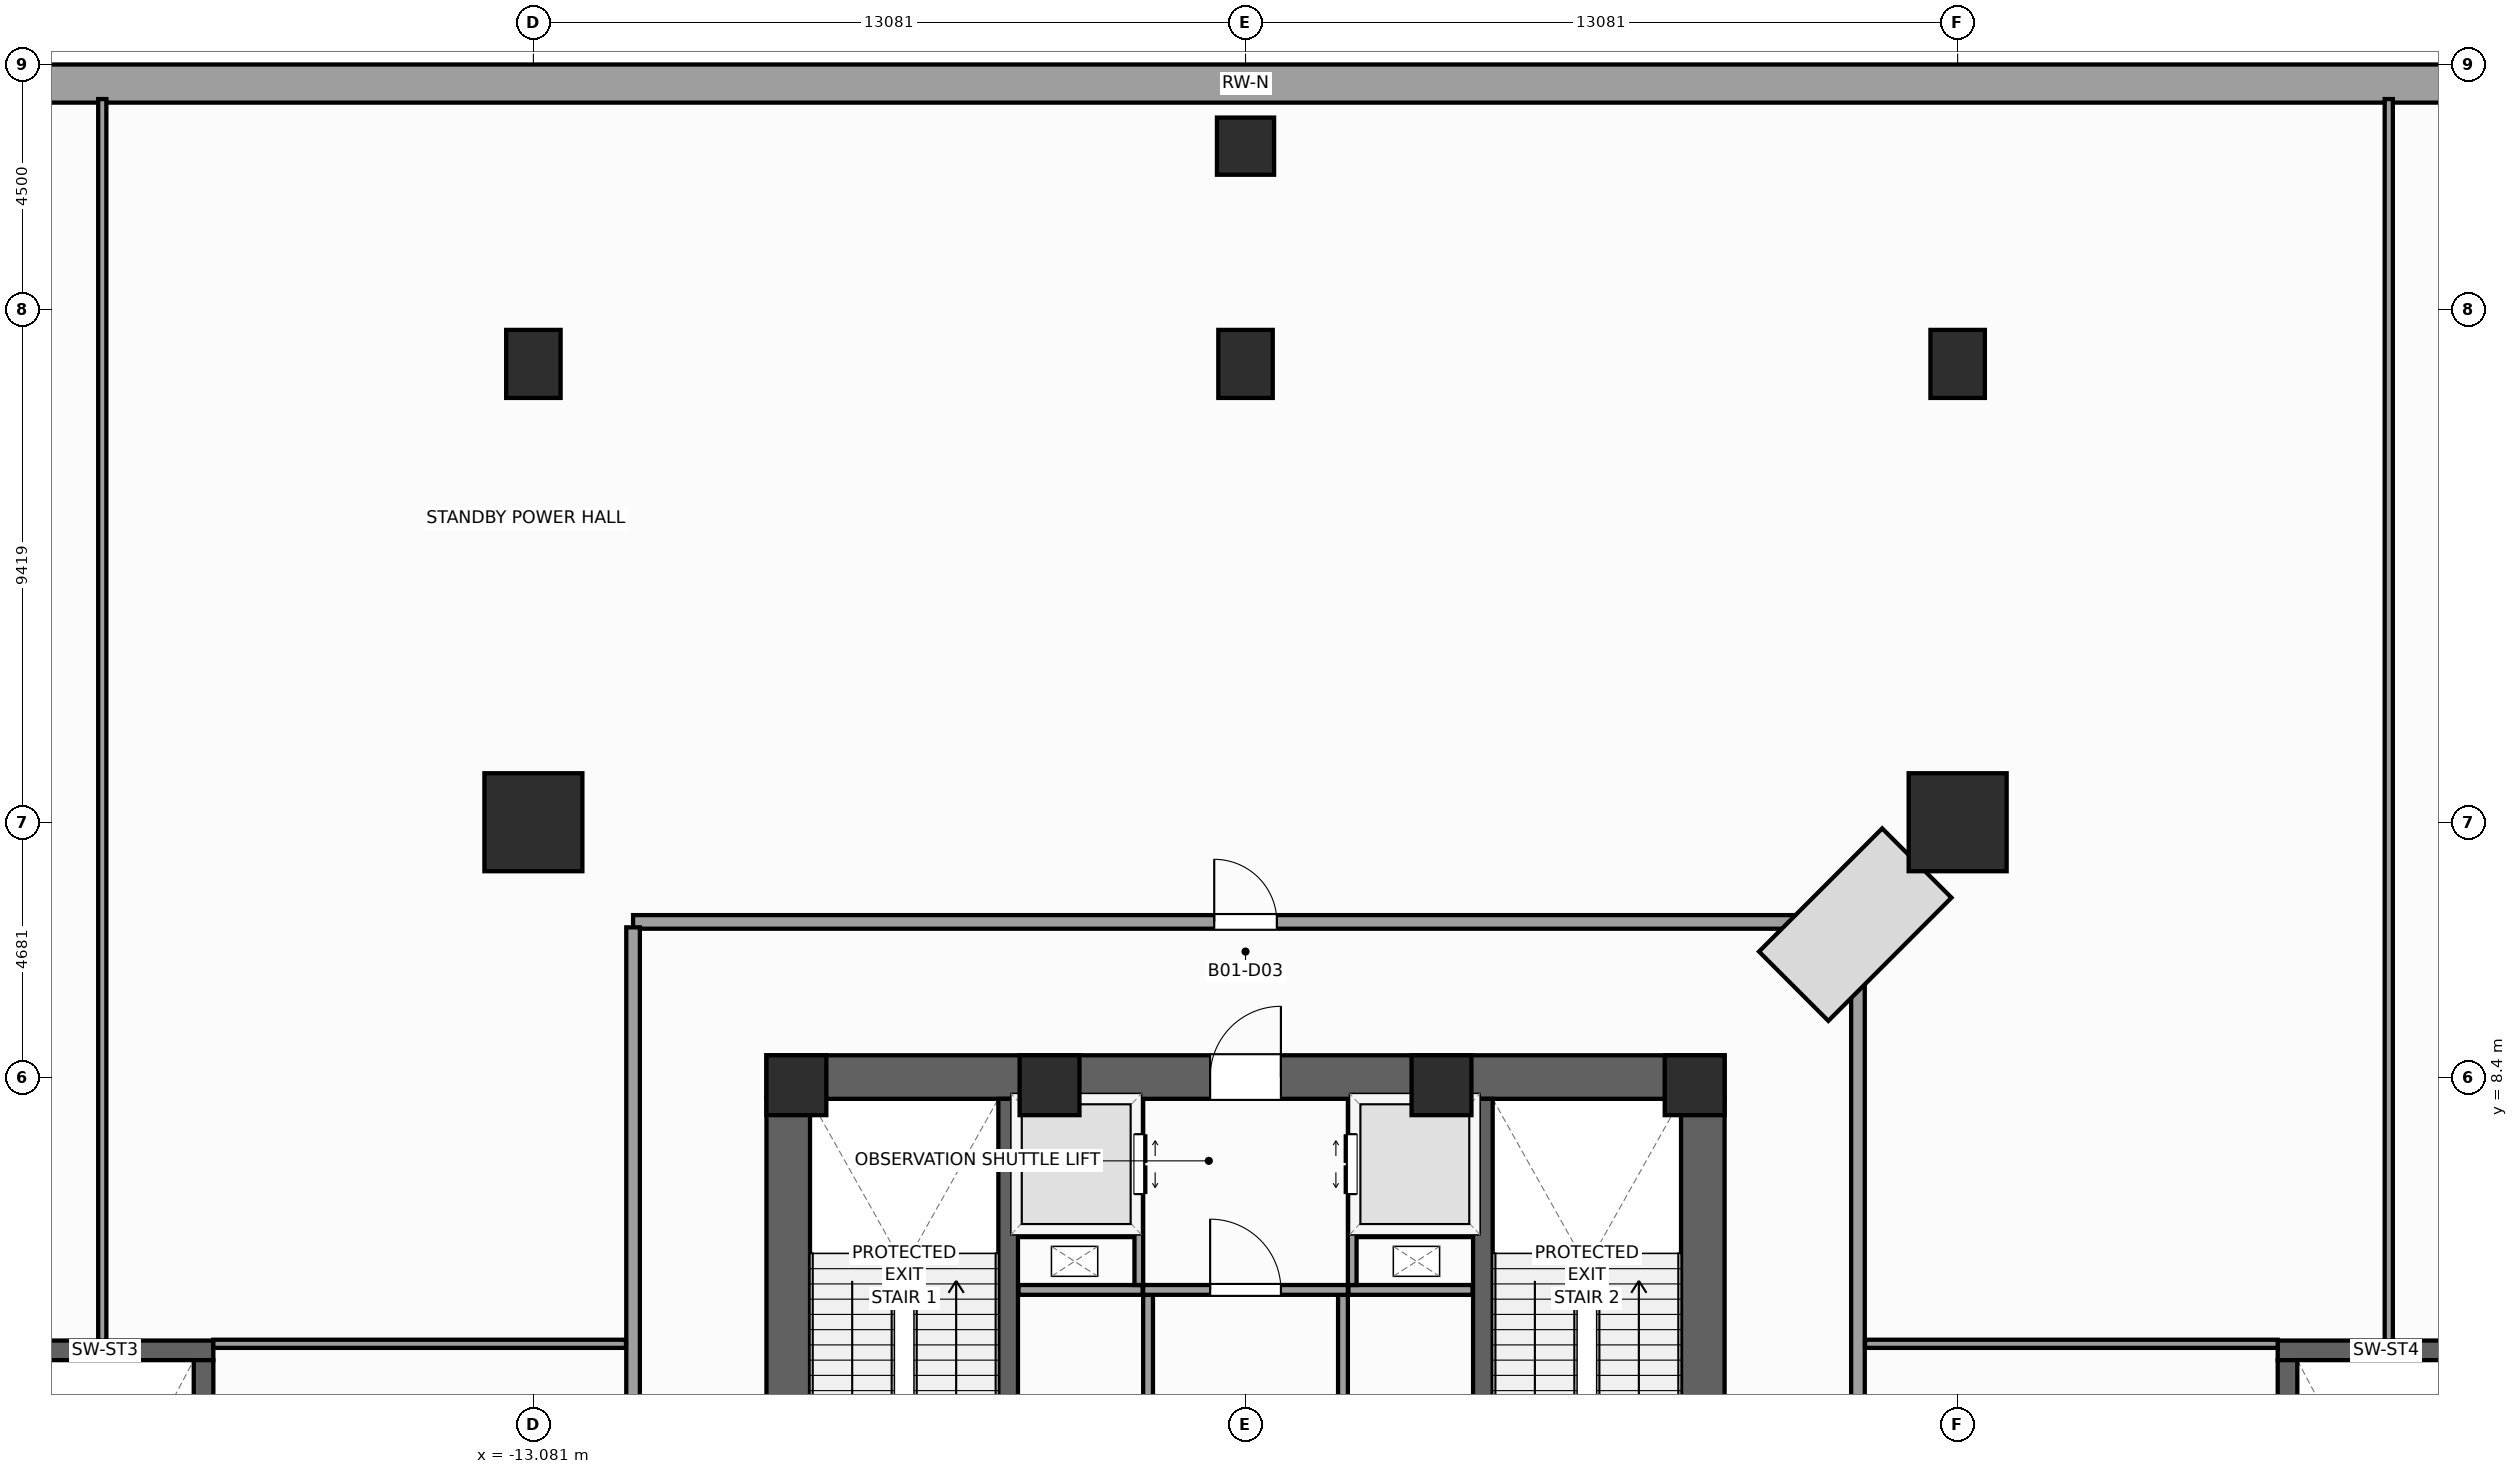
"""IFC4 building model, lengths in metres.
Left out: names, types, materials, properties, quantities, classifications, styles, units other than length and angle.
Written with IfcOpenShell. Run it as: python <this file> out.ifc"""

import sys

from ifc_helpers import new_model, si_unit, direction, frame, frame_2d, origin, origin_2d, place, context, subcontext, project, spatial, rectangle, extrude, source, transform, mapped, element, fill, save


model = new_model("IFC4")
c1 = context("Model", 3, precision=1e-05, world=origin(), true_north=direction((0.0, 1.0)))
c2 = subcontext(c1, "Body", "Model", "MODEL_VIEW")
j1 = project(units=[si_unit("LENGTHUNIT", "METRE"), si_unit("PLANEANGLEUNIT", "RADIAN")], contexts=[c1])
p1 = place(None, origin())
s1 = spatial("IfcSite", under=j1, at=p1, CompositionType="ELEMENT")
p2 = place(p1, origin())
s2 = spatial("IfcBuilding", under=s1, at=p2, CompositionType="ELEMENT")
p3 = place(p2, frame((0.0, 0.0, -4.5)))
s3 = spatial("IfcBuildingStorey", under=s2, at=p3, CompositionType="ELEMENT", Elevation=-4.5)
p4 = place(p3, frame((-8.8, 8.4, 0.0), z_axis=(0.0, 0.0, 1.0), x_axis=(1.0, 0.0, 0.0)))
e1 = element("IfcWall", 1, at=p4, inside=s3, PredefinedType="SHEAR", context=c2, shape_type="SweptSolid", body=[
    extrude(rectangle(XDim=17.6, YDim=0.8, at=frame_2d((8.8, 0.0))), origin(), (0.0, 0.0, 1.0), 4.5),
])
p5 = place(p4, frame((8.15, 0.0, 0.0)))
e2 = element("IfcOpeningElement", 2, at=p5, cuts=e1, PredefinedType="OPENING", context=c2, shape_type="SweptSolid", body=[
    extrude(rectangle(XDim=1.3, YDim=2.2, at=frame_2d((0.65, 1.1))), frame((0.0, 0.41, 0.0), z_axis=(0.0, -1.0, 0.0), x_axis=(1.0, 0.0, 0.0)), (0.0, 0.0, 1.0), 0.82),
])
p6 = place(p3, frame((-8.4, -8.0, 0.0), z_axis=(0.0, 0.0, 1.0), x_axis=(0.0, 1.0, 0.0)))
e3 = element("IfcWall", 3, at=p6, inside=s3, PredefinedType="SHEAR", context=c2, shape_type="SweptSolid", body=[
    extrude(rectangle(XDim=16.0, YDim=0.8, at=frame_2d((8.0, 0.0))), origin(), (0.0, 0.0, 1.0), 4.5),
])
p7 = place(p6, frame((4.69, 0.0, 0.0)))
e4 = element("IfcOpeningElement", 4, at=p7, cuts=e3, PredefinedType="OPENING", context=c2, shape_type="SweptSolid", body=[
    extrude(rectangle(XDim=1.3, YDim=2.2, at=frame_2d((0.65, 1.1))), frame((0.0, 0.41, 0.0), z_axis=(0.0, -1.0, 0.0), x_axis=(1.0, 0.0, 0.0)), (0.0, 0.0, 1.0), 0.82),
])
p8 = place(p3, frame((8.4, -8.0, 0.0), z_axis=(0.0, 0.0, 1.0), x_axis=(0.0, 1.0, 0.0)))
e5 = element("IfcWall", 5, at=p8, inside=s3, PredefinedType="SHEAR", context=c2, shape_type="SweptSolid", body=[
    extrude(rectangle(XDim=16.0, YDim=0.8, at=frame_2d((8.0, 0.0))), origin(), (0.0, 0.0, 1.0), 4.5),
])
p9 = place(p8, frame((4.69, 0.0, 0.0)))
e6 = element("IfcOpeningElement", 6, at=p9, cuts=e5, PredefinedType="OPENING", context=c2, shape_type="SweptSolid", body=[
    extrude(rectangle(XDim=1.3, YDim=2.2, at=frame_2d((0.65, 1.1))), frame((0.0, 0.41, 0.0), z_axis=(0.0, -1.0, 0.0), x_axis=(1.0, 0.0, 0.0)), (0.0, 0.0, 1.0), 0.82),
])
for number, where, z_axis, x_axis in (
    (7, (-4.36, -8.0, 0.0), (0.0, 0.0, 1.0), (0.0, 1.0, 0.0)),
    (8, (4.36, -8.0, 0.0), (0.0, 0.0, 1.0), (0.0, 1.0, 0.0)),
):
    element("IfcWall", number, at=place(p3, frame(where, z_axis=z_axis, x_axis=x_axis)), inside=s3, PredefinedType="SHEAR", context=c2, shape_type="SweptSolid", body=[
        extrude(rectangle(XDim=16.0, YDim=0.36, at=frame_2d((8.0, 0.0))), origin(), (0.0, 0.0, 1.0), 4.5),
    ])
p10 = place(p3, frame((-22.94, 3.38, 0.0), z_axis=(0.0, 0.0, 1.0), x_axis=(1.0, 0.0, 0.0)))
e9 = element("IfcWall", 9, at=p10, inside=s3, PredefinedType="SHEAR", context=c2, shape_type="SweptSolid", body=[
    extrude(rectangle(XDim=3.98, YDim=0.36, at=frame_2d((1.99, 0.0))), origin(), (0.0, 0.0, 1.0), 4.5),
])
p11 = place(p3, frame((-19.14, -4.6, 0.0), z_axis=(0.0, 0.0, 1.0), x_axis=(0.0, 1.0, 0.0)))
e10 = element("IfcWall", 10, at=p11, inside=s3, PredefinedType="SHEAR", context=c2, shape_type="SweptSolid", body=[
    extrude(rectangle(XDim=7.8, YDim=0.36, at=frame_2d((3.9, 0.0))), origin(), (0.0, 0.0, 1.0), 4.5),
])
p12 = place(p3, frame((18.96, 3.38, 0.0), z_axis=(0.0, 0.0, 1.0), x_axis=(1.0, 0.0, 0.0)))
e11 = element("IfcWall", 11, at=p12, inside=s3, PredefinedType="SHEAR", context=c2, shape_type="SweptSolid", body=[
    extrude(rectangle(XDim=3.98, YDim=0.36, at=frame_2d((1.99, 0.0))), origin(), (0.0, 0.0, 1.0), 4.5),
])
p13 = place(p3, frame((19.14, -4.6, 0.0), z_axis=(0.0, 0.0, 1.0), x_axis=(0.0, 1.0, 0.0)))
e12 = element("IfcWall", 12, at=p13, inside=s3, PredefinedType="SHEAR", context=c2, shape_type="SweptSolid", body=[
    extrude(rectangle(XDim=7.8, YDim=0.36, at=frame_2d((3.9, 0.0))), origin(), (0.0, 0.0, 1.0), 4.5),
])
p14 = place(p3, frame((-42.0, 26.65, 0.0), z_axis=(0.0, 0.0, 1.0), x_axis=(1.0, 0.0, 0.0)))
e13 = element("IfcWall", 13, at=p14, inside=s3, PredefinedType="USERDEFINED", context=c2, shape_type="SweptSolid", body=[
    extrude(rectangle(XDim=84.0, YDim=0.7, at=frame_2d((42.0, 0.0))), origin(), (0.0, 0.0, 1.0), 4.5),
])
m1 = source(origin(), c2, "Body", "SweptSolid", [
    extrude(rectangle(XDim=1.1, YDim=1.1, at=origin_2d()), origin(), (0.0, 0.0, 1.0), 4.5),
])
for number, where, z_axis, x_axis in (
    (14, (8.25, 8.25, 0.0), (0.0, 0.0, 1.0), (1.0, 0.0, 0.0)),
    (15, (-8.25, 8.25, 0.0), (0.0, 0.0, 1.0), (1.0, 0.0, 0.0)),
    (16, (-3.6, 8.25, 0.0), (0.0, 0.0, 1.0), (1.0, 0.0, 0.0)),
    (17, (3.6, 8.25, 0.0), (0.0, 0.0, 1.0), (1.0, 0.0, 0.0)),
):
    element("IfcColumn", number, at=place(p3, frame(where, z_axis=z_axis, x_axis=x_axis)), inside=s3, PredefinedType="PILASTER", context=c2, shape_type="MappedRepresentation", body=[
        mapped(m1, transform((0.0, 0.0, 0.0), scale=1.0)),
    ])
m2 = source(origin(), c2, "Body", "SweptSolid", [
    extrude(rectangle(XDim=1.8, YDim=1.8, at=origin_2d()), origin(), (0.0, 0.0, 1.0), 4.5),
])
for number, where, z_axis, x_axis in (
    (18, (13.081, 13.081, 0.0), (0.0, 0.0, 1.0), (1.0, 0.0, 0.0)),
    (19, (-13.081, 13.081, 0.0), (0.0, 0.0, 1.0), (1.0, 0.0, 0.0)),
):
    element("IfcColumn", number, at=place(p3, frame(where, z_axis=z_axis, x_axis=x_axis)), inside=s3, PredefinedType="COLUMN", context=c2, shape_type="MappedRepresentation", body=[
        mapped(m2, transform((0.0, 0.0, 0.0), scale=1.0)),
    ])
m3 = source(origin(), c2, "Body", "SweptSolid", [
    extrude(rectangle(XDim=1.0, YDim=1.25, at=origin_2d()), origin(), (0.0, 0.0, 1.0), 4.5),
])
for number, where, z_axis, x_axis in (
    (20, (-13.081, 21.5, 0.0), (0.0, 0.0, 1.0), (1.0, 0.0, 0.0)),
    (21, (0.0, 21.5, 0.0), (0.0, 0.0, 1.0), (1.0, 0.0, 0.0)),
    (22, (13.081, 21.5, 0.0), (0.0, 0.0, 1.0), (1.0, 0.0, 0.0)),
):
    element("IfcColumn", number, at=place(p3, frame(where, z_axis=z_axis, x_axis=x_axis)), inside=s3, PredefinedType="COLUMN", context=c2, shape_type="MappedRepresentation", body=[
        mapped(m3, transform((0.0, 0.0, 0.0), scale=1.0)),
    ])
m4 = source(origin(), c2, "Body", "SweptSolid", [
    extrude(rectangle(XDim=1.05, YDim=1.05, at=origin_2d()), origin(), (0.0, 0.0, 1.0), 4.5),
])
p15 = place(p3, frame((0.0, 25.5, 0.0), z_axis=(0.0, 0.0, 1.0), x_axis=(1.0, 0.0, 0.0)))
e23 = element("IfcColumn", 23, at=p15, inside=s3, PredefinedType="COLUMN", context=c2, shape_type="MappedRepresentation", body=[
    mapped(m4, transform((0.0, 0.0, 0.0), scale=1.0)),
])
for number, where, z_axis, x_axis in (
    (24, (-1.79, -7.98, 0.0), (0.0, 0.0, 1.0), (0.0, 1.0, 0.0)),
    (25, (1.79, -7.98, 0.0), (0.0, 0.0, 1.0), (0.0, 1.0, 0.0)),
):
    element("IfcWall", number, at=place(p3, frame(where, z_axis=z_axis, x_axis=x_axis)), inside=s3, PredefinedType="PARTITIONING", context=c2, shape_type="SweptSolid", body=[
        extrude(rectangle(XDim=12.38, YDim=0.18, at=frame_2d((6.19, 0.0))), origin(), (0.0, 0.0, 1.0), 4.1),
    ])
p16 = place(p3, frame((-1.88, 4.49, 0.0), z_axis=(0.0, 0.0, 1.0), x_axis=(1.0, 0.0, 0.0)))
e26 = element("IfcWall", 26, at=p16, inside=s3, PredefinedType="PARTITIONING", context=c2, shape_type="SweptSolid", body=[
    extrude(rectangle(XDim=3.76, YDim=0.18, at=frame_2d((1.88, 0.0))), origin(), (0.0, 0.0, 1.0), 4.1),
])
p17 = place(p16, frame((1.23, 0.0, 0.0)))
e27 = element("IfcOpeningElement", 27, at=p17, cuts=e26, PredefinedType="OPENING", context=c2, shape_type="SweptSolid", body=[
    extrude(rectangle(XDim=1.3, YDim=2.2, at=frame_2d((0.65, 1.1))), frame((0.0, 0.1, 0.0), z_axis=(0.0, -1.0, 0.0), x_axis=(1.0, 0.0, 0.0)), (0.0, 0.0, 1.0), 0.2),
])
for number, where, z_axis, x_axis in (
    (28, (-4.17, 4.49, 0.0), (0.0, 0.0, 1.0), (1.0, 0.0, 0.0)),
    (29, (1.89, 4.49, 0.0), (0.0, 0.0, 1.0), (1.0, 0.0, 0.0)),
):
    element("IfcWall", number, at=place(p3, frame(where, z_axis=z_axis, x_axis=x_axis)), inside=s3, PredefinedType="PARTITIONING", context=c2, shape_type="SweptSolid", body=[
        extrude(rectangle(XDim=2.28, YDim=0.18, at=frame_2d((1.14, 0.0))), origin(), (0.0, 0.0, 1.0), 4.1),
    ])
p18 = place(p3, frame((-1.96, 4.58, 0.0), z_axis=(0.0, 0.0, 1.0), x_axis=(0.0, 1.0, 0.0)))
e30 = element("IfcWall", 30, at=p18, inside=s3, PredefinedType="PARTITIONING", context=c2, shape_type="SweptSolid", body=[
    extrude(rectangle(XDim=3.4, YDim=0.16, at=frame_2d((1.7, 0.0))), origin(), (0.0, 0.0, 1.0), 4.1),
])
p19 = place(p18, frame((1.67, 0.0, 0.0)))
e31 = element("IfcOpeningElement", 31, at=p19, cuts=e30, PredefinedType="OPENING", context=c2, shape_type="SweptSolid", body=[
    extrude(rectangle(XDim=1.1, YDim=2.2, at=frame_2d((0.55, 1.1))), frame((0.0, 0.09, 0.0), z_axis=(0.0, -1.0, 0.0), x_axis=(1.0, 0.0, 0.0)), (0.0, 0.0, 1.0), 0.18),
])
p20 = place(p3, frame((1.96, 4.58, 0.0), z_axis=(0.0, 0.0, 1.0), x_axis=(0.0, 1.0, 0.0)))
e32 = element("IfcWall", 32, at=p20, inside=s3, PredefinedType="PARTITIONING", context=c2, shape_type="SweptSolid", body=[
    extrude(rectangle(XDim=3.4, YDim=0.16, at=frame_2d((1.7, 0.0))), origin(), (0.0, 0.0, 1.0), 4.1),
])
p21 = place(p20, frame((1.67, 0.0, 0.0)))
e33 = element("IfcOpeningElement", 33, at=p21, cuts=e32, PredefinedType="OPENING", context=c2, shape_type="SweptSolid", body=[
    extrude(rectangle(XDim=1.1, YDim=2.2, at=frame_2d((0.55, 1.1))), frame((0.0, 0.09, 0.0), z_axis=(0.0, -1.0, 0.0), x_axis=(1.0, 0.0, 0.0)), (0.0, 0.0, 1.0), 0.18),
])
for number, where, z_axis, x_axis in (
    (34, (-4.16, 5.52, 0.0), (0.0, 0.0, 1.0), (1.0, 0.0, 0.0)),
    (35, (2.06, 5.52, 0.0), (0.0, 0.0, 1.0), (1.0, 0.0, 0.0)),
):
    element("IfcWall", number, at=place(p3, frame(where, z_axis=z_axis, x_axis=x_axis)), inside=s3, PredefinedType="PARTITIONING", context=c2, shape_type="SweptSolid", body=[
        extrude(rectangle(XDim=2.1, YDim=0.12, at=frame_2d((1.05, 0.0))), origin(), (0.0, 0.0, 1.0), 4.1),
    ])
p22 = place(p3, frame((-11.25, 11.25, 0.0), z_axis=(0.0, 0.0, 1.0), x_axis=(1.0, 0.0, 0.0)))
e36 = element("IfcWall", 36, at=p22, inside=s3, PredefinedType="PARTITIONING", context=c2, shape_type="SweptSolid", body=[
    extrude(rectangle(XDim=22.5, YDim=0.25, at=frame_2d((11.25, 0.0))), origin(), (0.0, 0.0, 1.0), 4.1),
])
p23 = place(p22, frame((10.675, 0.0, 0.0)))
e37 = element("IfcOpeningElement", 37, at=p23, cuts=e36, PredefinedType="OPENING", context=c2, shape_type="SweptSolid", body=[
    extrude(rectangle(XDim=1.15, YDim=2.25, at=frame_2d((0.575, 1.125))), frame((0.0, 0.135, 0.0), z_axis=(0.0, -1.0, 0.0), x_axis=(1.0, 0.0, 0.0)), (0.0, 0.0, 1.0), 0.27),
])
p24 = place(p3, frame((-11.25, -4.96, 0.0), z_axis=(0.0, 0.0, 1.0), x_axis=(0.0, 1.0, 0.0)))
e38 = element("IfcWall", 38, at=p24, inside=s3, PredefinedType="PARTITIONING", context=c2, shape_type="SweptSolid", body=[
    extrude(rectangle(XDim=16.11, YDim=0.25, at=frame_2d((8.055, 0.0))), origin(), (0.0, 0.0, 1.0), 4.1),
])
p25 = place(p24, frame((3.82, 0.0, 0.0)))
e39 = element("IfcOpeningElement", 39, at=p25, cuts=e38, PredefinedType="OPENING", context=c2, shape_type="SweptSolid", body=[
    extrude(rectangle(XDim=1.15, YDim=2.25, at=frame_2d((0.575, 1.125))), frame((0.0, 0.135, 0.0), z_axis=(0.0, -1.0, 0.0), x_axis=(1.0, 0.0, 0.0)), (0.0, 0.0, 1.0), 0.27),
])
p26 = place(p3, frame((11.25, -4.96, 0.0), z_axis=(0.0, 0.0, 1.0), x_axis=(0.0, 1.0, 0.0)))
e40 = element("IfcWall", 40, at=p26, inside=s3, PredefinedType="PARTITIONING", context=c2, shape_type="SweptSolid", body=[
    extrude(rectangle(XDim=16.11, YDim=0.25, at=frame_2d((8.055, 0.0))), origin(), (0.0, 0.0, 1.0), 4.1),
])
p27 = place(p26, frame((3.82, 0.0, 0.0)))
e41 = element("IfcOpeningElement", 41, at=p27, cuts=e40, PredefinedType="OPENING", context=c2, shape_type="SweptSolid", body=[
    extrude(rectangle(XDim=1.15, YDim=2.25, at=frame_2d((0.575, 1.125))), frame((0.0, 0.135, 0.0), z_axis=(0.0, -1.0, 0.0), x_axis=(1.0, 0.0, 0.0)), (0.0, 0.0, 1.0), 0.27),
])
for number, where, z_axis, x_axis in (
    (42, (-21.0, 3.56, 0.0), (0.0, 0.0, 1.0), (0.0, 1.0, 0.0)),
    (43, (21.0, 3.56, 0.0), (0.0, 0.0, 1.0), (0.0, 1.0, 0.0)),
):
    element("IfcWall", number, at=place(p3, frame(where, z_axis=z_axis, x_axis=x_axis)), inside=s3, PredefinedType="PARTITIONING", context=c2, shape_type="SweptSolid", body=[
        extrude(rectangle(XDim=22.805, YDim=0.15, at=frame_2d((11.402, 0.0))), origin(), (0.0, 0.0, 1.0), 4.1),
    ])
for number, where, z_axis, x_axis in (
    (44, (-18.96, 3.5, 0.0), (0.0, 0.0, 1.0), (1.0, 0.0, 0.0)),
    (45, (11.38, 3.5, 0.0), (0.0, 0.0, 1.0), (1.0, 0.0, 0.0)),
):
    element("IfcWall", number, at=place(p3, frame(where, z_axis=z_axis, x_axis=x_axis)), inside=s3, PredefinedType="PARTITIONING", context=c2, shape_type="SweptSolid", body=[
        extrude(rectangle(XDim=7.58, YDim=0.15, at=frame_2d((3.79, 0.0))), origin(), (0.0, 0.0, 1.0), 4.1),
    ])
m5 = source(origin(), c2, "Body", "SweptSolid", [
    extrude(rectangle(XDim=1.3, YDim=2.2, at=frame_2d((0.65, 1.1))), frame((0.0, 0.025, 0.0), z_axis=(0.0, -1.0, 0.0), x_axis=(1.0, 0.0, 0.0)), (0.0, 0.0, 1.0), 0.05),
])
p28 = place(p17, origin())
e46 = element("IfcDoor", 46, at=p28, inside=s3, OperationType="SINGLE_SWING_LEFT", PredefinedType="DOOR", context=c2, shape_type="MappedRepresentation", body=[
    mapped(m5, transform((0.0, 0.0, 0.0), scale=1.0)),
])
fill(e27, e46)
p29 = place(p5, origin())
e47 = element("IfcDoor", 47, at=p29, inside=s3, OperationType="SINGLE_SWING_RIGHT", PredefinedType="DOOR", context=c2, shape_type="MappedRepresentation", body=[
    mapped(m5, transform((0.0, 0.0, 0.0), scale=1.0)),
])
fill(e2, e47)
m6 = source(origin(), c2, "Body", "SweptSolid", [
    extrude(rectangle(XDim=1.1, YDim=2.2, at=frame_2d((0.55, 1.1))), frame((0.0, 0.025, 0.0), z_axis=(0.0, -1.0, 0.0), x_axis=(1.0, 0.0, 0.0)), (0.0, 0.0, 1.0), 0.05),
])
p30 = place(p19, frame((1.1, 0.0, 0.0), z_axis=(0.0, 0.0, 1.0), x_axis=(-1.0, 0.0, 0.0)))
e48 = element("IfcDoor", 48, at=p30, inside=s3, OperationType="DOUBLE_DOOR_SLIDING", PredefinedType="DOOR", context=c2, shape_type="MappedRepresentation", body=[
    mapped(m6, transform((0.0, 0.0, 0.0), scale=1.0)),
])
fill(e31, e48)
p31 = place(p21, origin())
e49 = element("IfcDoor", 49, at=p31, inside=s3, OperationType="DOUBLE_DOOR_SLIDING", PredefinedType="DOOR", context=c2, shape_type="MappedRepresentation", body=[
    mapped(m6, transform((0.0, 0.0, 0.0), scale=1.0)),
])
fill(e33, e49)
m7 = source(origin(), c2, "Body", "SweptSolid", [
    extrude(rectangle(XDim=1.15, YDim=2.25, at=frame_2d((0.575, 1.125))), frame((0.0, 0.025, 0.0), z_axis=(0.0, -1.0, 0.0), x_axis=(1.0, 0.0, 0.0)), (0.0, 0.0, 1.0), 0.05),
])
p32 = place(p23, origin())
e50 = element("IfcDoor", 50, at=p32, inside=s3, OperationType="SINGLE_SWING_LEFT", PredefinedType="DOOR", context=c2, shape_type="MappedRepresentation", body=[
    mapped(m7, transform((0.0, 0.0, 0.0), scale=1.0)),
])
fill(e37, e50)
save(model, sys.argv[1])
